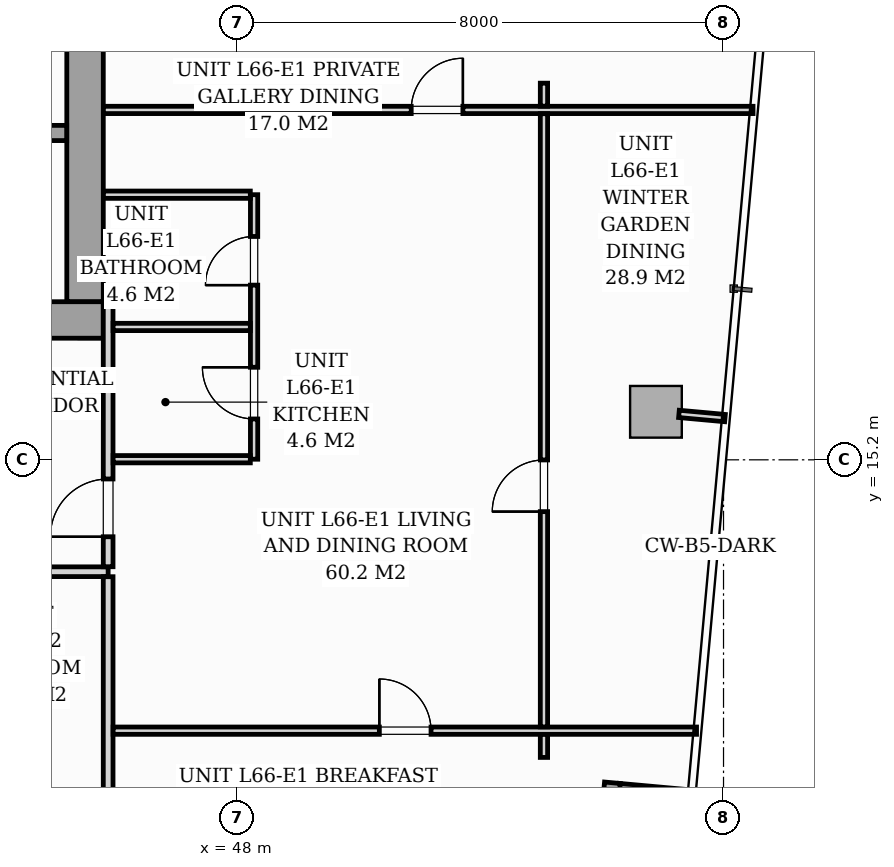
"""IFC4 building model, lengths in metres.
Left out: names, types, materials, properties, quantities, classifications, styles, units other than length and angle.
Written with IfcOpenShell. Run it as: python <this file> out.ifc"""

import sys

from ifc_helpers import new_model, si_unit, direction, frame, frame_2d, origin, origin_2d, place, context, subcontext, project, spatial, rectangle, i_section, extrude, source, transform, mapped, element, fill, save


model = new_model("IFC4")
c1 = context("Model", 3, precision=1e-05, world=origin(), true_north=direction((0.0, 1.0)))
c2 = subcontext(c1, "Body", "Model", "MODEL_VIEW")
j1 = project(units=[si_unit("LENGTHUNIT", "METRE"), si_unit("PLANEANGLEUNIT", "RADIAN")], contexts=[c1])
p1 = place(None, origin())
s1 = spatial("IfcSite", under=j1, at=p1, CompositionType="ELEMENT")
p2 = place(p1, origin())
s2 = spatial("IfcBuilding", under=s1, at=p2, CompositionType="ELEMENT")
p3 = place(p2, frame((0.0, 0.0, 229.8)))
s3 = spatial("IfcBuildingStorey", under=s2, at=p3, CompositionType="ELEMENT", Elevation=229.8)
m1 = source(origin(), c2, "Body", "SweptSolid", [
    extrude(i_section(OverallWidth=0.409, OverallDepth=0.425, WebThickness=0.033, FlangeThickness=0.052, FilletRadius=0.018, at=origin_2d()), origin(), (0.0, 0.0, 1.0), 3.296),
])
p4 = place(p3, frame((45.6, 17.4, 0.002), z_axis=(0.0, 0.0, 1.0), x_axis=(1.0, 0.0, 0.0)))
e1 = element("IfcColumn", 1, at=p4, inside=s3, PredefinedType="PILASTER", context=c2, shape_type="MappedRepresentation", body=[
    mapped(m1, transform((0.0, 0.0, 0.0), scale=1.0)),
])
m2 = source(origin(), c2, "Body", "SweptSolid", [
    extrude(rectangle(XDim=0.85, YDim=0.85, at=origin_2d()), origin(), (0.0, 0.0, 1.0), 3.296),
])
p5 = place(p3, frame((54.889, 15.99, 0.002), z_axis=(0.0, 0.0, 1.0), x_axis=(0.995884398616, -0.090632580198, 0.0)))
e2 = element("IfcColumn", 2, at=p5, inside=s3, PredefinedType="COLUMN", context=c2, shape_type="MappedRepresentation", body=[
    mapped(m2, transform((0.0, 0.0, 0.0), scale=1.0)),
])
for number, where, z_axis, x_axis in (
    (3, (55.665, 9.623, 0.0), (0.0, 0.0, 1.0), (-0.996, 0.091, 0.0)),
    (4, (54.173, 9.889, 0.0), (0.0, 0.0, 1.0), (-0.091, -0.996, 0.0)),
):
    element("IfcWall", number, at=place(p3, frame(where, z_axis=z_axis, x_axis=x_axis)), inside=s3, PredefinedType="STANDARD", context=c2, shape_type="SweptSolid", body=[
        extrude(rectangle(XDim=1.395, YDim=0.26, at=frame_2d((0.698, 0.0))), origin(), (0.0, 0.0, 1.0), 3.04),
    ])
p6 = place(p3, frame((26.2, 17.5, 0.0), z_axis=(0.0, 0.0, 1.0), x_axis=(1.0, 0.0, 0.0)))
e5 = element("IfcWall", 5, at=p6, inside=s3, PredefinedType="SHEAR", context=c2, shape_type="SweptSolid", body=[
    extrude(rectangle(XDim=19.6, YDim=0.6, at=frame_2d((9.8, 0.0))), origin(), (0.0, 0.0, 1.0), 3.3),
])
p7 = place(p6, frame((0.95, 0.0, 0.0)))
e6 = element("IfcOpeningElement", 6, at=p7, cuts=e5, PredefinedType="OPENING", context=c2, shape_type="SweptSolid", body=[
    extrude(rectangle(XDim=0.95, YDim=2.06, at=frame_2d((0.475, 1.03))), frame((0.0, 0.31, 0.0), z_axis=(0.0, -1.0, 0.0), x_axis=(1.0, 0.0, 0.0)), (0.0, 0.0, 1.0), 0.62),
])
p8 = place(p6, frame((9.38, 0.0, 0.0)))
e7 = element("IfcOpeningElement", 7, at=p8, cuts=e5, PredefinedType="OPENING", context=c2, shape_type="SweptSolid", body=[
    extrude(rectangle(XDim=0.85, YDim=2.0, at=frame_2d((0.425, 1.0))), frame((0.0, 0.31, 0.0), z_axis=(0.0, -1.0, 0.0), x_axis=(1.0, 0.0, 0.0)), (0.0, 0.0, 1.0), 0.62),
])
p9 = place(p6, frame((17.55, 0.0, 0.0)))
e8 = element("IfcOpeningElement", 8, at=p9, cuts=e5, PredefinedType="OPENING", context=c2, shape_type="SweptSolid", body=[
    extrude(rectangle(XDim=0.95, YDim=2.06, at=frame_2d((0.475, 1.03))), frame((0.0, 0.31, 0.0), z_axis=(0.0, -1.0, 0.0), x_axis=(1.0, 0.0, 0.0)), (0.0, 0.0, 1.0), 0.62),
])
p10 = place(p3, frame((45.5, 17.802, 0.0), z_axis=(0.0, 0.0, 1.0), x_axis=(0.0, 1.0, 0.0)))
e9 = element("IfcWall", 9, at=p10, inside=s3, PredefinedType="SHEAR", context=c2, shape_type="SweptSolid", body=[
    extrude(rectangle(XDim=5.796, YDim=0.6, at=frame_2d((2.898, 0.0))), origin(), (0.0, 0.0, 1.0), 3.3),
])
p11 = place(p3, frame((37.05, 20.575, 0.0), z_axis=(0.0, 0.0, 1.0), x_axis=(1.0, 0.0, 0.0)))
e10 = element("IfcWall", 10, at=p11, inside=s3, PredefinedType="SOLIDWALL", context=c2, shape_type="SweptSolid", body=[
    extrude(rectangle(XDim=8.148, YDim=0.25, at=frame_2d((4.074, 0.0))), origin(), (0.0, 0.0, 1.0), 3.3),
])
p12 = place(p11, frame((6.6, 0.0, 0.0)))
e11 = element("IfcOpeningElement", 11, at=p12, cuts=e10, PredefinedType="OPENING", context=c2, shape_type="SweptSolid", body=[
    extrude(rectangle(XDim=0.95, YDim=2.06, at=frame_2d((0.475, 1.03))), frame((0.0, 0.135, 0.0), z_axis=(0.0, -1.0, 0.0), x_axis=(1.0, 0.0, 0.0)), (0.0, 0.0, 1.0), 0.27),
])
p13 = place(p3, frame((24.55, 13.36, 0.0), z_axis=(0.0, 0.0, 1.0), x_axis=(1.0, 0.0, 0.0)))
e12 = element("IfcWall", 12, at=p13, inside=s3, PredefinedType="PARTITIONING", context=c2, shape_type="SweptSolid", body=[
    extrude(rectangle(XDim=21.33, YDim=0.16, at=frame_2d((10.665, 0.0))), origin(), (0.0, 0.0, 1.0), 2.55),
])
p14 = place(p13, frame((2.37, 0.0, 0.0)))
e13 = element("IfcOpeningElement", 13, at=p14, cuts=e12, PredefinedType="OPENING", context=c2, shape_type="SweptSolid", body=[
    extrude(rectangle(XDim=0.95, YDim=2.06, at=frame_2d((0.475, 1.03))), frame((0.0, 0.09, 0.0), z_axis=(0.0, -1.0, 0.0), x_axis=(1.0, 0.0, 0.0)), (0.0, 0.0, 1.0), 0.18),
])
p15 = place(p13, frame((13.707, 0.0, 0.0)))
e14 = element("IfcOpeningElement", 14, at=p15, cuts=e12, PredefinedType="OPENING", context=c2, shape_type="SweptSolid", body=[
    extrude(rectangle(XDim=0.95, YDim=2.06, at=frame_2d((0.475, 1.03))), frame((0.0, 0.09, 0.0), z_axis=(0.0, -1.0, 0.0), x_axis=(1.0, 0.0, 0.0)), (0.0, 0.0, 1.0), 0.18),
])
p16 = place(p3, frame((45.88, 8.136, 0.0), z_axis=(0.0, 0.0, 1.0), x_axis=(0.0, 1.0, 0.0)))
e15 = element("IfcWall", 15, at=p16, inside=s3, PredefinedType="PARTITIONING", context=c2, shape_type="SweptSolid", body=[
    extrude(rectangle(XDim=5.142, YDim=0.16, at=frame_2d((2.571, 0.0))), origin(), (0.0, 0.0, 1.0), 3.04),
])
p17 = place(p3, frame((45.88, 13.442, 0.0), z_axis=(0.0, 0.0, 1.0), x_axis=(0.0, 1.0, 0.0)))
e16 = element("IfcWall", 16, at=p17, inside=s3, PredefinedType="PARTITIONING", context=c2, shape_type="SweptSolid", body=[
    extrude(rectangle(XDim=4.36, YDim=0.16, at=frame_2d((2.18, 0.0))), origin(), (0.0, 0.0, 1.0), 3.04),
])
p18 = place(p17, frame((0.493, 0.0, 0.0)))
e17 = element("IfcOpeningElement", 17, at=p18, cuts=e16, PredefinedType="OPENING", context=c2, shape_type="SweptSolid", body=[
    extrude(rectangle(XDim=0.95, YDim=2.06, at=frame_2d((0.475, 1.03))), frame((0.0, 0.09, 0.0), z_axis=(0.0, -1.0, 0.0), x_axis=(1.0, 0.0, 0.0)), (0.0, 0.0, 1.0), 0.18),
])
p19 = place(p3, frame((48.28, 15.21, 0.0), z_axis=(0.0, 0.0, 1.0), x_axis=(0.0, 1.0, 0.0)))
e18 = element("IfcWall", 18, at=p19, inside=s3, PredefinedType="PARTITIONING", context=c2, shape_type="SweptSolid", body=[
    extrude(rectangle(XDim=4.35, YDim=0.12, at=frame_2d((2.175, 0.0))), origin(), (0.0, 0.0, 1.0), 3.04),
])
p20 = place(p19, frame((0.662, 0.0, 0.0)))
e19 = element("IfcOpeningElement", 19, at=p20, cuts=e18, PredefinedType="OPENING", context=c2, shape_type="SweptSolid", body=[
    extrude(rectangle(XDim=0.85, YDim=2.05, at=frame_2d((0.425, 1.025))), frame((0.0, 0.07, 0.0), z_axis=(0.0, -1.0, 0.0), x_axis=(1.0, 0.0, 0.0)), (0.0, 0.0, 1.0), 0.14),
])
p21 = place(p19, frame((2.863, 0.0, 0.0)))
e20 = element("IfcOpeningElement", 20, at=p21, cuts=e18, PredefinedType="OPENING", context=c2, shape_type="SweptSolid", body=[
    extrude(rectangle(XDim=0.8, YDim=2.02, at=frame_2d((0.4, 1.01))), frame((0.0, 0.07, 0.0), z_axis=(0.0, -1.0, 0.0), x_axis=(1.0, 0.0, 0.0)), (0.0, 0.0, 1.0), 0.14),
])
p22 = place(p3, frame((45.962, 17.385, 0.0), z_axis=(0.0, 0.0, 1.0), x_axis=(1.0, 0.0, 0.0)))
e21 = element("IfcWall", 21, at=p22, inside=s3, PredefinedType="PARTITIONING", context=c2, shape_type="SweptSolid", body=[
    extrude(rectangle(XDim=2.256, YDim=0.12, at=frame_2d((1.128, 0.0))), origin(), (0.0, 0.0, 1.0), 2.381),
])
p23 = place(p3, frame((45.962, 15.21, 0.0), z_axis=(0.0, 0.0, 1.0), x_axis=(1.0, 0.0, 0.0)))
e22 = element("IfcWall", 22, at=p23, inside=s3, PredefinedType="PARTITIONING", context=c2, shape_type="SweptSolid", body=[
    extrude(rectangle(XDim=2.256, YDim=0.12, at=frame_2d((1.128, 0.0))), origin(), (0.0, 0.0, 1.0), 3.04),
])
p24 = place(p3, frame((45.802, 19.56, 0.0), z_axis=(0.0, 0.0, 1.0), x_axis=(1.0, 0.0, 0.0)))
e23 = element("IfcWall", 23, at=p24, inside=s3, PredefinedType="PARTITIONING", context=c2, shape_type="SweptSolid", body=[
    extrude(rectangle(XDim=2.416, YDim=0.12, at=frame_2d((1.208, 0.0))), origin(), (0.0, 0.0, 1.0), 3.04),
])
p25 = place(p3, frame((45.962, 10.746, 0.0), z_axis=(0.0, 0.0, 1.0), x_axis=(1.0, 0.0, 0.0)))
e24 = element("IfcWall", 24, at=p25, inside=s3, PredefinedType="PARTITIONING", context=c2, shape_type="SweptSolid", body=[
    extrude(rectangle(XDim=9.594, YDim=0.12, at=frame_2d((4.797, 0.0))), origin(), (0.0, 0.0, 1.0), 3.04),
])
p26 = place(p25, frame((4.378, 0.0, 0.0)))
e25 = element("IfcOpeningElement", 25, at=p26, cuts=e24, PredefinedType="OPENING", context=c2, shape_type="SweptSolid", body=[
    extrude(rectangle(XDim=0.85, YDim=2.05, at=frame_2d((0.425, 1.025))), frame((0.0, 0.07, 0.0), z_axis=(0.0, -1.0, 0.0), x_axis=(1.0, 0.0, 0.0)), (0.0, 0.0, 1.0), 0.14),
])
p27 = place(p3, frame((45.802, 20.954, 0.0), z_axis=(0.0, 0.0, 1.0), x_axis=(1.0, 0.0, 0.0)))
e26 = element("IfcWall", 26, at=p27, inside=s3, PredefinedType="PARTITIONING", context=c2, shape_type="SweptSolid", body=[
    extrude(rectangle(XDim=10.683, YDim=0.12, at=frame_2d((5.342, 0.0))), origin(), (0.0, 0.0, 1.0), 3.04),
])
p28 = place(p27, frame((5.062, 0.0, 0.0)))
e27 = element("IfcOpeningElement", 27, at=p28, cuts=e26, PredefinedType="OPENING", context=c2, shape_type="SweptSolid", body=[
    extrude(rectangle(XDim=0.85, YDim=2.05, at=frame_2d((0.425, 1.025))), frame((0.0, 0.07, 0.0), z_axis=(0.0, -1.0, 0.0), x_axis=(1.0, 0.0, 0.0)), (0.0, 0.0, 1.0), 0.14),
])
p29 = place(p3, frame((53.047, 10.306, 0.0), z_axis=(0.0, 0.0, 1.0), x_axis=(0.0, 1.0, 0.0)))
e28 = element("IfcWall", 28, at=p29, inside=s3, PredefinedType="PARTITIONING", context=c2, shape_type="SweptSolid", body=[
    extrude(rectangle(XDim=0.378, YDim=0.12, at=frame_2d((0.189, 0.0))), origin(), (0.0, 0.0, 1.0), 3.04),
])
p30 = place(p3, frame((53.047, 10.808, 0.0), z_axis=(0.0, 0.0, 1.0), x_axis=(0.0, 1.0, 0.0)))
e29 = element("IfcWall", 29, at=p30, inside=s3, PredefinedType="PARTITIONING", context=c2, shape_type="SweptSolid", body=[
    extrude(rectangle(XDim=10.084, YDim=0.12, at=frame_2d((5.042, 0.0))), origin(), (0.0, 0.0, 1.0), 3.04),
])
p31 = place(p30, frame((3.54, 0.0, 0.0)))
e30 = element("IfcOpeningElement", 30, at=p31, cuts=e29, PredefinedType="OPENING", context=c2, shape_type="SweptSolid", body=[
    extrude(rectangle(XDim=0.85, YDim=2.05, at=frame_2d((0.425, 1.025))), frame((0.0, 0.07, 0.0), z_axis=(0.0, -1.0, 0.0), x_axis=(1.0, 0.0, 0.0)), (0.0, 0.0, 1.0), 0.14),
])
p32 = place(p3, frame((53.047, 21.016, 0.0), z_axis=(0.0, 0.0, 1.0), x_axis=(0.0, 1.0, 0.0)))
e31 = element("IfcWall", 31, at=p32, inside=s3, PredefinedType="PARTITIONING", context=c2, shape_type="SweptSolid", body=[
    extrude(rectangle(XDim=0.378, YDim=0.12, at=frame_2d((0.189, 0.0))), origin(), (0.0, 0.0, 1.0), 3.04),
])
p33 = place(p3, frame((55.267, 15.955, 0.0), z_axis=(0.0, 0.0, 1.0), x_axis=(0.995887938321, -0.09059367697, 0.0)))
e32 = element("IfcWall", 32, at=p33, inside=s3, PredefinedType="PARTITIONING", context=c2, shape_type="SweptSolid", body=[
    extrude(rectangle(XDim=0.76, YDim=0.12, at=frame_2d((0.38, 0.0))), origin(), (0.0, 0.0, 1.0), 3.04),
])
m3 = source(origin(), c2, "Body", "SweptSolid", [
    extrude(rectangle(XDim=0.95, YDim=2.06, at=frame_2d((0.475, 1.03))), frame((0.0, 0.025, 0.0), z_axis=(0.0, -1.0, 0.0), x_axis=(1.0, 0.0, 0.0)), (0.0, 0.0, 1.0), 0.05),
])
p34 = place(p18, origin())
e33 = element("IfcDoor", 33, at=p34, inside=s3, OperationType="SINGLE_SWING_LEFT", PredefinedType="DOOR", context=c2, shape_type="MappedRepresentation", body=[
    mapped(m3, transform((0.0, 0.0, 0.0), scale=1.0)),
])
fill(e17, e33)
m4 = source(origin(), c2, "Body", "SweptSolid", [
    extrude(rectangle(XDim=0.85, YDim=2.05, at=frame_2d((0.425, 1.025))), frame((0.0, 0.025, 0.0), z_axis=(0.0, -1.0, 0.0), x_axis=(1.0, 0.0, 0.0)), (0.0, 0.0, 1.0), 0.05),
])
p35 = place(p20, origin())
e34 = element("IfcDoor", 34, at=p35, inside=s3, OperationType="SINGLE_SWING_RIGHT", PredefinedType="DOOR", context=c2, shape_type="MappedRepresentation", body=[
    mapped(m4, transform((0.0, 0.0, 0.0), scale=1.0)),
])
fill(e19, e34)
m5 = source(origin(), c2, "Body", "SweptSolid", [
    extrude(rectangle(XDim=0.8, YDim=2.02, at=frame_2d((0.4, 1.01))), frame((0.0, 0.025, 0.0), z_axis=(0.0, -1.0, 0.0), x_axis=(1.0, 0.0, 0.0)), (0.0, 0.0, 1.0), 0.05),
])
p36 = place(p21, origin())
e35 = element("IfcDoor", 35, at=p36, inside=s3, OperationType="SINGLE_SWING_LEFT", PredefinedType="DOOR", context=c2, shape_type="MappedRepresentation", body=[
    mapped(m5, transform((0.0, 0.0, 0.0), scale=1.0)),
])
fill(e20, e35)
p37 = place(p26, origin())
e36 = element("IfcDoor", 36, at=p37, inside=s3, OperationType="SINGLE_SWING_LEFT", PredefinedType="DOOR", context=c2, shape_type="MappedRepresentation", body=[
    mapped(m4, transform((0.0, 0.0, 0.0), scale=1.0)),
])
fill(e25, e36)
p38 = place(p28, origin())
e37 = element("IfcDoor", 37, at=p38, inside=s3, OperationType="SINGLE_SWING_RIGHT", PredefinedType="DOOR", context=c2, shape_type="MappedRepresentation", body=[
    mapped(m4, transform((0.0, 0.0, 0.0), scale=1.0)),
])
fill(e27, e37)
p39 = place(p31, origin())
e38 = element("IfcDoor", 38, at=p39, inside=s3, OperationType="SINGLE_SWING_LEFT", PredefinedType="DOOR", context=c2, shape_type="MappedRepresentation", body=[
    mapped(m4, transform((0.0, 0.0, 0.0), scale=1.0)),
])
fill(e30, e38)
save(model, sys.argv[1])
